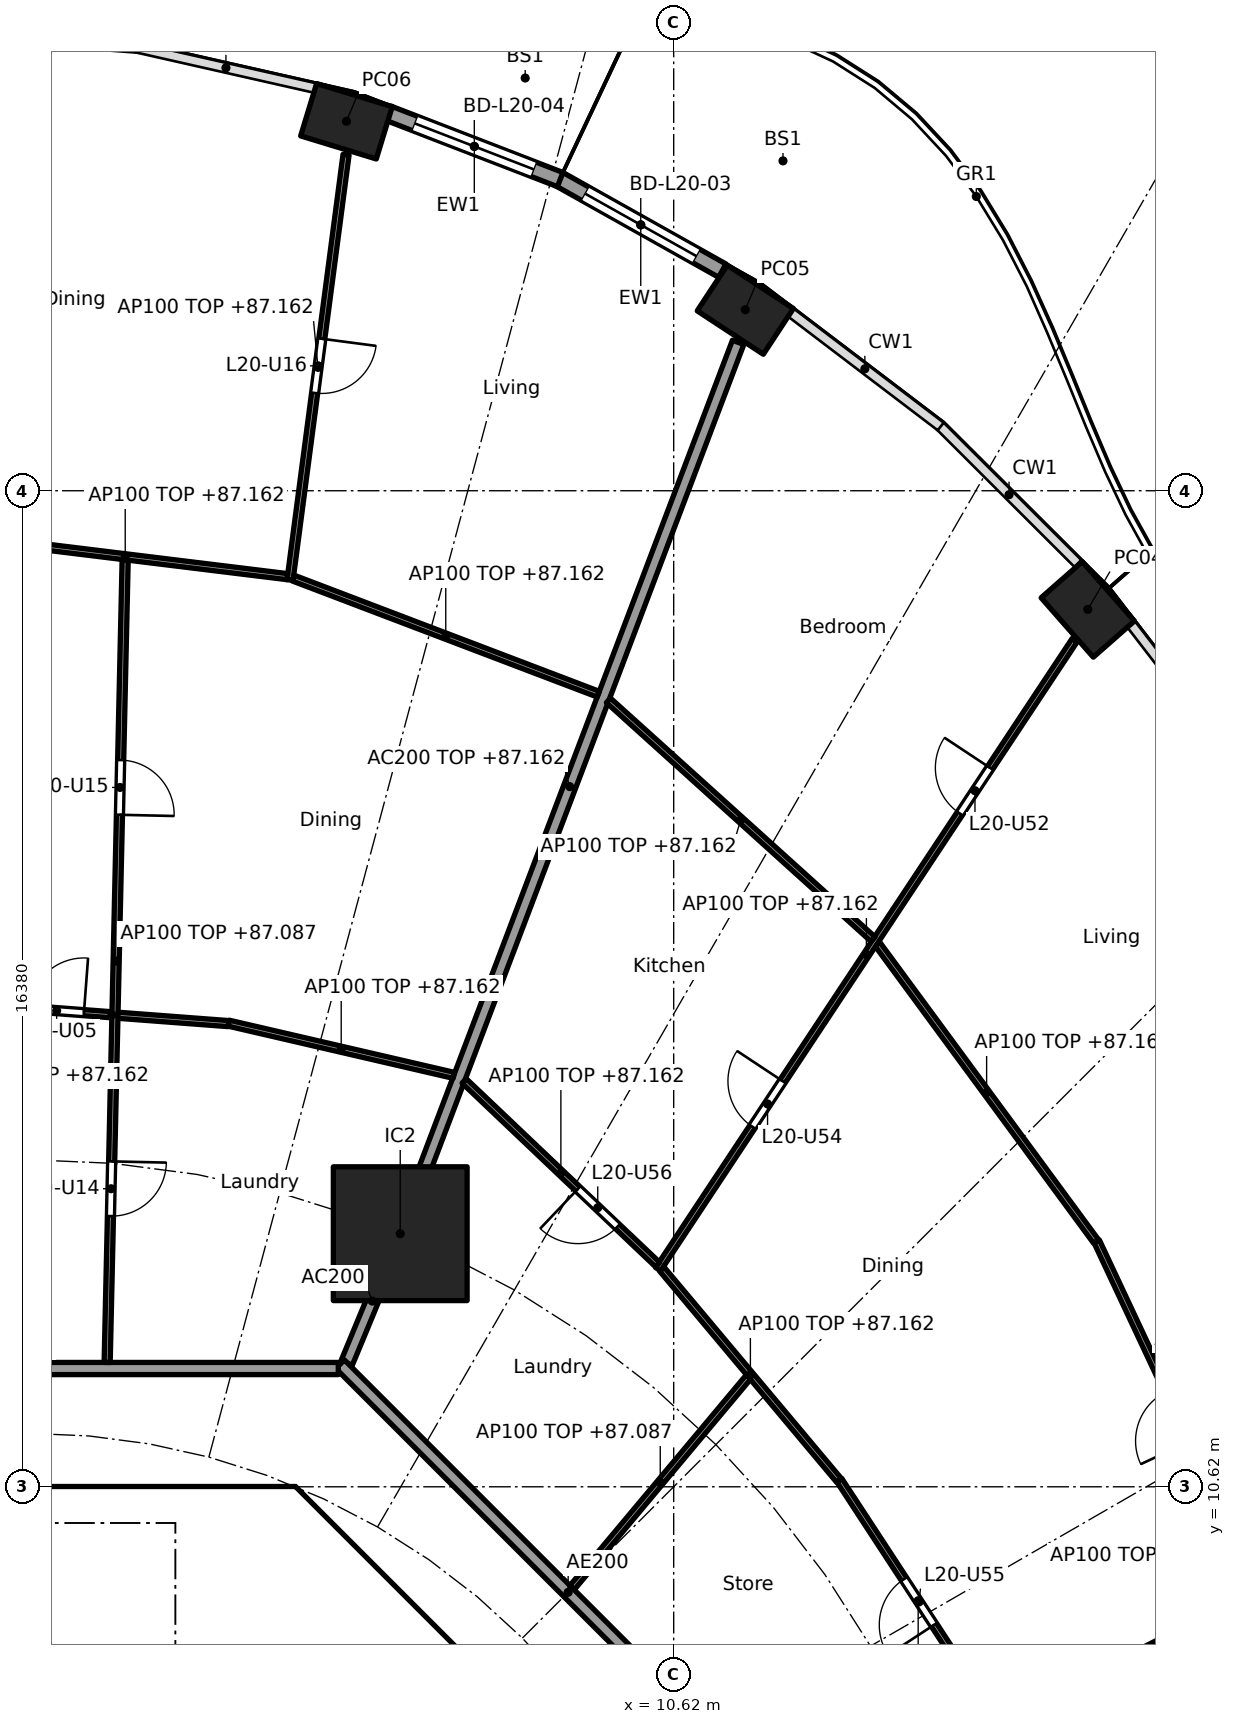
"""IFC4 building model, lengths in metres.
Left out: names, types, materials, properties, quantities, classifications, styles, units other than length and angle.
Written with IfcOpenShell. Run it as: python <this file> out.ifc"""

import sys

from ifc_helpers import new_model, si_unit, direction, frame, frame_2d, origin, origin_2d, place, context, subcontext, project, spatial, polyline, rectangle, hollow_rectangle, outline, extrude, element, fill, save


model = new_model("IFC4")
c1 = context("Model", 3, precision=1e-05, world=origin(), true_north=direction((0.0, 1.0)))
c2 = subcontext(c1, "Body", "Model", "MODEL_VIEW")
j1 = project(units=[si_unit("LENGTHUNIT", "METRE"), si_unit("PLANEANGLEUNIT", "RADIAN")], contexts=[c1])
p1 = place(None, origin())
s1 = spatial("IfcSite", under=j1, at=p1, CompositionType="ELEMENT")
p2 = place(p1, origin())
s2 = spatial("IfcBuilding", under=s1, at=p2, CompositionType="ELEMENT")
p3 = place(p2, frame((0.0, 0.0, 84.4)))
s3 = spatial("IfcBuildingStorey", under=s2, at=p3, CompositionType="ELEMENT", Elevation=84.4)
for number, where, z_axis, x_axis in (
    (1, (17.43, 25.049, 0.0), (0.0, 0.0, 1.0), (-0.66, 0.751, 0.0)),
    (2, (11.798, 29.978, 0.0), (0.0, 0.0, 1.0), (-0.836, 0.549, 0.0)),
    (3, (5.239, 33.076, 0.0), (0.0, 0.0, 1.0), (-0.957, 0.292, 0.0)),
):
    element("IfcColumn", number, at=place(p3, frame(where, z_axis=z_axis, x_axis=x_axis)), inside=s3, PredefinedType="COLUMN", context=c2, shape_type="SweptSolid", body=[
        extrude(hollow_rectangle(XDim=1.3, YDim=0.9, WallThickness=0.045, at=origin_2d()), origin(), (0.0, 0.0, 1.0), 3.7),
    ])
p4 = place(p3, frame((6.123, 14.782, 0.0), z_axis=(0.0, 0.0, 1.0), x_axis=(1.0, 0.0, 0.0)))
e4 = element("IfcColumn", 4, at=p4, inside=s3, PredefinedType="COLUMN", context=c2, shape_type="SweptSolid", body=[
    extrude(rectangle(XDim=2.2, YDim=2.2, at=origin_2d()), origin(), (0.0, 0.0, 1.0), 3.7),
])
p5 = place(p3, frame((8.737, 32.125, 0.0), z_axis=(0.0, 0.0, 1.0), x_axis=(0.872071158476, -0.489379090843, 0.0)))
e5 = element("IfcWall", 5, at=p5, inside=s3, PredefinedType="SOLIDWALL", context=c2, shape_type="SweptSolid", body=[
    extrude(rectangle(XDim=3.076, YDim=0.25, at=frame_2d((1.538, 0.0))), origin(), (0.0, 0.0, 1.0), 3.44),
])
p6 = place(p5, frame((0.488, 0.0, 0.0)))
e6 = element("IfcOpeningElement", 6, at=p6, cuts=e5, PredefinedType="OPENING", context=c2, shape_type="SweptSolid", body=[
    extrude(rectangle(XDim=2.1, YDim=2.4, at=frame_2d((1.05, 1.2))), frame((0.0, 0.135, 0.0), z_axis=(0.0, -1.0, 0.0), x_axis=(1.0, 0.0, 0.0)), (0.0, 0.0, 1.0), 0.27),
])
p7 = place(p3, frame((5.929, 33.208, 0.0), z_axis=(0.0, 0.0, 1.0), x_axis=(0.932837560624, -0.360297218263, 0.0)))
e7 = element("IfcWall", 7, at=p7, inside=s3, PredefinedType="SOLIDWALL", context=c2, shape_type="SweptSolid", body=[
    extrude(rectangle(XDim=3.028, YDim=0.25, at=frame_2d((1.514, 0.0))), origin(), (0.0, 0.0, 1.0), 3.44),
])
p8 = place(p7, frame((0.464, 0.0, 0.0)))
e8 = element("IfcOpeningElement", 8, at=p8, cuts=e7, PredefinedType="OPENING", context=c2, shape_type="SweptSolid", body=[
    extrude(rectangle(XDim=2.1, YDim=2.4, at=frame_2d((1.05, 1.2))), frame((0.0, 0.135, 0.0), z_axis=(0.0, -1.0, 0.0), x_axis=(1.0, 0.0, 0.0)), (0.0, 0.0, 1.0), 0.27),
])
p9 = place(p3, frame((9.988, 4.613, 0.0), z_axis=(0.0, 0.0, 1.0), x_axis=(-0.707106781187, 0.707106781187, 0.0)))
e9 = element("IfcWall", 9, at=p9, inside=s3, PredefinedType="SHEAR", context=c2, shape_type="SweptSolid", body=[
    extrude(rectangle(XDim=7.602, YDim=0.6, at=frame_2d((3.801, 0.0))), origin(), (0.0, 0.0, 1.0), 3.44),
])
p10 = place(p9, frame((3.201, 0.0, 0.0)))
e10 = element("IfcOpeningElement", 10, at=p10, cuts=e9, PredefinedType="OPENING", context=c2, shape_type="SweptSolid", body=[
    extrude(rectangle(XDim=1.2, YDim=2.1, at=frame_2d((0.6, 1.05))), frame((0.0, 0.31, 0.0), z_axis=(0.0, -1.0, 0.0), x_axis=(1.0, 0.0, 0.0)), (0.0, 0.0, 1.0), 0.62),
])
p11 = place(p3, frame((4.0, 7.025, 0.0), z_axis=(0.0, 0.0, 1.0), x_axis=(0.0, 1.0, 0.0)))
e11 = element("IfcWall", 11, at=p11, inside=s3, PredefinedType="SOLIDWALL", context=c2, shape_type="SweptSolid", body=[
    extrude(rectangle(XDim=3.0, YDim=0.2, at=frame_2d((1.5, 0.0))), origin(), (0.0, 0.0, 1.0), 3.44),
])
p12 = place(p11, frame((0.925, 0.0, 0.0)))
e12 = element("IfcOpeningElement", 12, at=p12, cuts=e11, PredefinedType="OPENING", context=c2, shape_type="SweptSolid", body=[
    extrude(rectangle(XDim=1.1, YDim=2.1, at=frame_2d((0.55, 1.05))), frame((0.0, 0.11, 0.0), z_axis=(0.0, -1.0, 0.0), x_axis=(1.0, 0.0, 0.0)), (0.0, 0.0, 1.0), 0.22),
])
p13 = place(p3, origin())
e13 = element("IfcWall", 13, at=p13, inside=s3, PredefinedType="SHEAR", context=c2, shape_type="SweptSolid", body=[
    extrude(outline(polyline([(-4.152, 10.025), (-4.401, 9.776), (-4.825, 10.2), (-4.401, 10.625), (4.401, 10.625), (4.825, 10.2), (4.401, 9.776), (4.152, 10.025), (-4.152, 10.025)])), origin(), (0.0, 0.0, 1.0), 3.44),
])
p14 = place(p3, frame((5.243, 12.657, 0.0), z_axis=(0.0, 0.0, 1.0), x_axis=(0.382724096228, 0.923862687939, 0.0)))
e14 = element("IfcWall", 14, at=p14, inside=s3, PredefinedType="PARTITIONING", context=c2, shape_type="SweptSolid", body=[
    extrude(rectangle(XDim=2.201, YDim=0.2, at=frame_2d((1.1, 0.0))), origin(), (0.0, 0.0, 1.0), 3.44),
])
p15 = place(p3, frame((6.141, 14.829, 0.0), z_axis=(0.0, 0.0, 1.0), x_axis=(0.354477134193, 0.935064682968, 0.0)))
e15 = element("IfcWall", 15, at=p15, inside=s3, PredefinedType="PARTITIONING", context=c2, shape_type="SweptSolid", body=[
    extrude(rectangle(XDim=15.626, YDim=0.2, at=frame_2d((7.813, 0.0))), origin(), (0.0, 0.0, 1.0), 2.762),
])
p16 = place(p3, frame((12.635, 5.134, 0.0), z_axis=(0.0, 0.0, 1.0), x_axis=(-0.707106781187, 0.707106781187, 0.0)))
e16 = element("IfcWall", 16, at=p16, inside=s3, PredefinedType="PARTITIONING", context=c2, shape_type="SweptSolid", body=[
    extrude(rectangle(XDim=10.609, YDim=0.2, at=frame_2d((5.305, 0.0))), origin(), (0.0, 0.0, 1.0), 3.44),
])
p17 = place(p3, frame((5.104, 12.565, 0.0), z_axis=(0.0, 0.0, 1.0), x_axis=(-1.0, 0.0, 0.0)))
e17 = element("IfcWall", 17, at=p17, inside=s3, PredefinedType="PARTITIONING", context=c2, shape_type="SweptSolid", body=[
    extrude(rectangle(XDim=10.409, YDim=0.2, at=frame_2d((5.205, 0.0))), origin(), (0.0, 0.0, 1.0), 3.44),
])
p18 = place(p17, frame((8.508, 0.0, 0.0)))
e18 = element("IfcOpeningElement", 18, at=p18, cuts=e17, PredefinedType="OPENING", context=c2, shape_type="SweptSolid", body=[
    extrude(rectangle(XDim=1.0, YDim=2.1, at=frame_2d((0.5, 1.05))), frame((0.0, 0.11, 0.0), z_axis=(0.0, -1.0, 0.0), x_axis=(1.0, 0.0, 0.0)), (0.0, 0.0, 1.0), 0.22),
])
p19 = place(p3, frame((14.827, 6.146, 0.0), z_axis=(0.0, 0.0, 1.0), x_axis=(0.892068075337, 0.451901038906, 0.0)))
e19 = element("IfcWall", 19, at=p19, inside=s3, PredefinedType="PARTITIONING", context=c2, shape_type="SweptSolid", body=[
    extrude(rectangle(XDim=10.32, YDim=0.1, at=frame_2d((5.16, 0.0))), origin(), (0.0, 0.0, 1.0), 2.762),
])
p20 = place(p19, frame((7.763, 0.0, 0.0)))
e20 = element("IfcOpeningElement", 20, at=p20, cuts=e19, PredefinedType="OPENING", context=c2, shape_type="SweptSolid", body=[
    extrude(rectangle(XDim=0.9, YDim=2.1, at=frame_2d((0.45, 1.05))), frame((0.0, 0.06, 0.0), z_axis=(0.0, -1.0, 0.0), x_axis=(1.0, 0.0, 0.0)), (0.0, 0.0, 1.0), 0.12),
])
p21 = place(p3, frame((15.938, 6.764, 0.0), z_axis=(0.0, 0.0, 1.0), x_axis=(-0.547472878942, 0.836823426311, 0.0)))
e21 = element("IfcWall", 21, at=p21, inside=s3, PredefinedType="PARTITIONING", context=c2, shape_type="SweptSolid", body=[
    extrude(rectangle(XDim=4.738, YDim=0.1, at=frame_2d((2.369, 0.0))), origin(), (0.0, 0.0, 1.0), 2.762),
])
p22 = place(p21, frame((1.894, 0.0, 0.0)))
e22 = element("IfcOpeningElement", 22, at=p22, cuts=e21, PredefinedType="OPENING", context=c2, shape_type="SweptSolid", body=[
    extrude(rectangle(XDim=0.9, YDim=2.1, at=frame_2d((0.45, 1.05))), frame((0.0, 0.06, 0.0), z_axis=(0.0, -1.0, 0.0), x_axis=(1.0, 0.0, 0.0)), (0.0, 0.0, 1.0), 0.12),
])
p23 = place(p3, frame((20.252, 8.95, 0.0), z_axis=(0.0, 0.0, 1.0), x_axis=(-0.424580709335, 0.905390093419, 0.0)))
e23 = element("IfcWall", 23, at=p23, inside=s3, PredefinedType="PARTITIONING", context=c2, shape_type="SweptSolid", body=[
    extrude(rectangle(XDim=6.304, YDim=0.1, at=frame_2d((3.152, 0.0))), origin(), (0.0, 0.0, 1.0), 2.762),
])
p24 = place(p23, frame((2.677, 0.0, 0.0)))
e24 = element("IfcOpeningElement", 24, at=p24, cuts=e23, PredefinedType="OPENING", context=c2, shape_type="SweptSolid", body=[
    extrude(rectangle(XDim=0.9, YDim=2.1, at=frame_2d((0.45, 1.05))), frame((0.0, 0.06, 0.0), z_axis=(0.0, -1.0, 0.0), x_axis=(1.0, 0.0, 0.0)), (0.0, 0.0, 1.0), 0.12),
])
p25 = place(p3, frame((13.339, 10.725, 0.0), z_axis=(0.0, 0.0, 1.0), x_axis=(-0.642515455924, 0.766272724882, 0.0)))
e25 = element("IfcWall", 25, at=p25, inside=s3, PredefinedType="PARTITIONING", context=c2, shape_type="SweptSolid", body=[
    extrude(rectangle(XDim=4.537, YDim=0.1, at=frame_2d((2.269, 0.0))), origin(), (0.0, 0.0, 1.0), 2.762),
])
p26 = place(p3, frame((17.567, 14.653, 0.0), z_axis=(0.0, 0.0, 1.0), x_axis=(-0.592391983588, 0.80564988536, 0.0)))
e26 = element("IfcWall", 26, at=p26, inside=s3, PredefinedType="PARTITIONING", context=c2, shape_type="SweptSolid", body=[
    extrude(rectangle(XDim=6.08, YDim=0.1, at=frame_2d((3.04, 0.0))), origin(), (0.0, 0.0, 1.0), 2.762),
])
p27 = place(p3, frame((8.949, 8.961, 0.0), z_axis=(0.0, 0.0, 1.0), x_axis=(0.642048217601, 0.766664259162, 0.0)))
e27 = element("IfcWall", 27, at=p27, inside=s3, PredefinedType="PARTITIONING", context=c2, shape_type="SweptSolid", body=[
    extrude(rectangle(XDim=4.518, YDim=0.1, at=frame_2d((2.259, 0.0))), origin(), (0.0, 0.0, 1.0), 2.687),
])
p28 = place(p3, frame((10.364, 14.198, 0.0), z_axis=(0.0, 0.0, 1.0), x_axis=(0.552104552927, 0.833774887267, 0.0)))
e28 = element("IfcWall", 28, at=p28, inside=s3, PredefinedType="PARTITIONING", context=c2, shape_type="SweptSolid", body=[
    extrude(rectangle(XDim=12.407, YDim=0.1, at=frame_2d((6.203, 0.0))), origin(), (0.0, 0.0, 1.0), 2.762),
])
p29 = place(p28, frame((8.988, 0.0, 0.0)))
e29 = element("IfcOpeningElement", 29, at=p29, cuts=e28, PredefinedType="OPENING", context=c2, shape_type="SweptSolid", body=[
    extrude(rectangle(XDim=0.9, YDim=2.1, at=frame_2d((0.45, 1.05))), frame((0.0, 0.06, 0.0), z_axis=(0.0, -1.0, 0.0), x_axis=(1.0, 0.0, 0.0)), (0.0, 0.0, 1.0), 0.12),
])
p30 = place(p28, frame((2.809, 0.0, 0.0)))
e30 = element("IfcOpeningElement", 30, at=p30, cuts=e28, PredefinedType="OPENING", context=c2, shape_type="SweptSolid", body=[
    extrude(rectangle(XDim=0.9, YDim=2.1, at=frame_2d((0.45, 1.05))), frame((0.0, 0.06, 0.0), z_axis=(0.0, -1.0, 0.0), x_axis=(1.0, 0.0, 0.0)), (0.0, 0.0, 1.0), 0.12),
])
p31 = place(p3, frame((10.355, 14.274, 0.0), z_axis=(0.0, 0.0, 1.0), x_axis=(-0.725206433622, 0.688531501555, 0.0)))
e31 = element("IfcWall", 31, at=p31, inside=s3, PredefinedType="PARTITIONING", context=c2, shape_type="SweptSolid", body=[
    extrude(rectangle(XDim=4.387, YDim=0.1, at=frame_2d((2.193, 0.0))), origin(), (0.0, 0.0, 1.0), 2.762),
])
p32 = place(p31, frame((0.907, 0.0, 0.0)))
e32 = element("IfcOpeningElement", 32, at=p32, cuts=e31, PredefinedType="OPENING", context=c2, shape_type="SweptSolid", body=[
    extrude(rectangle(XDim=0.9, YDim=2.1, at=frame_2d((0.45, 1.05))), frame((0.0, 0.06, 0.0), z_axis=(0.0, -1.0, 0.0), x_axis=(1.0, 0.0, 0.0)), (0.0, 0.0, 1.0), 0.12),
])
p33 = place(p3, frame((13.898, 19.625, 0.0), z_axis=(0.0, 0.0, 1.0), x_axis=(-0.742396654702, 0.669960601146, 0.0)))
e33 = element("IfcWall", 33, at=p33, inside=s3, PredefinedType="PARTITIONING", context=c2, shape_type="SweptSolid", body=[
    extrude(rectangle(XDim=5.861, YDim=0.1, at=frame_2d((2.931, 0.0))), origin(), (0.0, 0.0, 1.0), 2.762),
])
p34 = place(p3, frame((7.004, 17.386, 0.0), z_axis=(0.0, 0.0, 1.0), x_axis=(-0.974179728512, 0.225773905837, 0.0)))
e34 = element("IfcWall", 34, at=p34, inside=s3, PredefinedType="PARTITIONING", context=c2, shape_type="SweptSolid", body=[
    extrude(rectangle(XDim=3.802, YDim=0.1, at=frame_2d((1.901, 0.0))), origin(), (0.0, 0.0, 1.0), 2.762),
])
p35 = place(p3, frame((9.379, 23.655, 0.0), z_axis=(0.0, 0.0, 1.0), x_axis=(-0.934613076136, 0.355666132653, 0.0)))
e35 = element("IfcWall", 35, at=p35, inside=s3, PredefinedType="PARTITIONING", context=c2, shape_type="SweptSolid", body=[
    extrude(rectangle(XDim=5.366, YDim=0.1, at=frame_2d((2.683, 0.0))), origin(), (0.0, 0.0, 1.0), 2.762),
])
p36 = place(p3, frame((3.299, 18.237, 0.0), z_axis=(0.0, 0.0, 1.0), x_axis=(-0.997152243414, 0.075414875552, 0.0)))
e36 = element("IfcWall", 36, at=p36, inside=s3, PredefinedType="PARTITIONING", context=c2, shape_type="SweptSolid", body=[
    extrude(rectangle(XDim=3.846, YDim=0.1, at=frame_2d((1.923, 0.0))), origin(), (0.0, 0.0, 1.0), 2.762),
])
p37 = place(p36, frame((2.385, 0.0, 0.0)))
e37 = element("IfcOpeningElement", 37, at=p37, cuts=e36, PredefinedType="OPENING", context=c2, shape_type="SweptSolid", body=[
    extrude(rectangle(XDim=0.9, YDim=2.1, at=frame_2d((0.45, 1.05))), frame((0.0, 0.06, 0.0), z_axis=(0.0, -1.0, 0.0), x_axis=(1.0, 0.0, 0.0)), (0.0, 0.0, 1.0), 0.12),
])
p38 = place(p3, frame((4.311, 25.531, 0.0), z_axis=(0.0, 0.0, 1.0), x_axis=(0.130604008227, 0.991434613595, 0.0)))
e38 = element("IfcWall", 38, at=p38, inside=s3, PredefinedType="PARTITIONING", context=c2, shape_type="SweptSolid", body=[
    extrude(rectangle(XDim=7.055, YDim=0.1, at=frame_2d((3.527, 0.0))), origin(), (0.0, 0.0, 1.0), 2.762),
])
p39 = place(p38, frame((3.102, 0.0, 0.0)))
e39 = element("IfcOpeningElement", 39, at=p39, cuts=e38, PredefinedType="OPENING", context=c2, shape_type="SweptSolid", body=[
    extrude(rectangle(XDim=0.9, YDim=2.1, at=frame_2d((0.45, 1.05))), frame((0.0, 0.06, 0.0), z_axis=(0.0, -1.0, 0.0), x_axis=(1.0, 0.0, 0.0)), (0.0, 0.0, 1.0), 0.12),
])
p40 = place(p3, frame((4.267, 25.587, 0.0), z_axis=(0.0, 0.0, 1.0), x_axis=(-0.992576206119, 0.121624319302, 0.0)))
e40 = element("IfcWall", 40, at=p40, inside=s3, PredefinedType="PARTITIONING", context=c2, shape_type="SweptSolid", body=[
    extrude(rectangle(XDim=5.374, YDim=0.1, at=frame_2d((2.687, 0.0))), origin(), (0.0, 0.0, 1.0), 2.762),
])
p41 = place(p3, frame((1.303, 12.665, 0.0), z_axis=(0.0, 0.0, 1.0), x_axis=(0.022412244057, 0.999748814111, 0.0)))
e41 = element("IfcWall", 41, at=p41, inside=s3, PredefinedType="PARTITIONING", context=c2, shape_type="SweptSolid", body=[
    extrude(rectangle(XDim=13.203, YDim=0.1, at=frame_2d((6.601, 0.0))), origin(), (0.0, 0.0, 1.0), 2.687),
])
p42 = place(p41, frame((2.407, 0.0, 0.0)))
e42 = element("IfcOpeningElement", 42, at=p42, cuts=e41, PredefinedType="OPENING", context=c2, shape_type="SweptSolid", body=[
    extrude(rectangle(XDim=0.9, YDim=2.1, at=frame_2d((0.45, 1.05))), frame((0.0, 0.06, 0.0), z_axis=(0.0, -1.0, 0.0), x_axis=(1.0, 0.0, 0.0)), (0.0, 0.0, 1.0), 0.12),
])
p43 = place(p41, frame((9.009, 0.0, 0.0)))
e43 = element("IfcOpeningElement", 43, at=p43, cuts=e41, PredefinedType="OPENING", context=c2, shape_type="SweptSolid", body=[
    extrude(rectangle(XDim=0.9, YDim=2.1, at=frame_2d((0.45, 1.05))), frame((0.0, 0.06, 0.0), z_axis=(0.0, -1.0, 0.0), x_axis=(1.0, 0.0, 0.0)), (0.0, 0.0, 1.0), 0.12),
])
p44 = place(p6, origin())
e44 = element("IfcDoor", 44, at=p44, inside=s3, OperationType="SLIDING_TO_LEFT", PredefinedType="DOOR", context=c2, shape_type="SweptSolid", body=[
    extrude(rectangle(XDim=2.1, YDim=2.4, at=frame_2d((1.05, 1.2))), frame((0.0, 0.025, 0.0), z_axis=(0.0, -1.0, 0.0), x_axis=(1.0, 0.0, 0.0)), (0.0, 0.0, 1.0), 0.05),
])
fill(e6, e44)
p45 = place(p8, origin())
e45 = element("IfcDoor", 45, at=p45, inside=s3, OperationType="SLIDING_TO_LEFT", PredefinedType="DOOR", context=c2, shape_type="SweptSolid", body=[
    extrude(rectangle(XDim=2.1, YDim=2.4, at=frame_2d((1.05, 1.2))), frame((0.0, 0.025, 0.0), z_axis=(0.0, -1.0, 0.0), x_axis=(1.0, 0.0, 0.0)), (0.0, 0.0, 1.0), 0.05),
])
fill(e8, e45)
p46 = place(p12, origin())
e46 = element("IfcDoor", 46, at=p46, inside=s3, OperationType="SINGLE_SWING_RIGHT", PredefinedType="DOOR", context=c2, shape_type="SweptSolid", body=[
    extrude(rectangle(XDim=1.1, YDim=2.1, at=frame_2d((0.55, 1.05))), frame((0.0, 0.025, 0.0), z_axis=(0.0, -1.0, 0.0), x_axis=(1.0, 0.0, 0.0)), (0.0, 0.0, 1.0), 0.05),
])
fill(e12, e46)
p47 = place(p37, frame((0.9, 0.0, 0.0), x_axis=(-1.0, 0.0, 0.0)))
e47 = element("IfcDoor", 47, at=p47, inside=s3, OperationType="SINGLE_SWING_RIGHT", PredefinedType="DOOR", context=c2, shape_type="SweptSolid", body=[
    extrude(rectangle(XDim=0.9, YDim=2.1, at=frame_2d((0.45, 1.05))), frame((0.0, 0.025, 0.0), z_axis=(0.0, -1.0, 0.0), x_axis=(1.0, 0.0, 0.0)), (0.0, 0.0, 1.0), 0.05),
])
fill(e37, e47)
p48 = place(p42, frame((0.9, 0.0, 0.0), x_axis=(-1.0, 0.0, 0.0)))
e48 = element("IfcDoor", 48, at=p48, inside=s3, OperationType="SINGLE_SWING_LEFT", PredefinedType="DOOR", context=c2, shape_type="SweptSolid", body=[
    extrude(rectangle(XDim=0.9, YDim=2.1, at=frame_2d((0.45, 1.05))), frame((0.0, 0.025, 0.0), z_axis=(0.0, -1.0, 0.0), x_axis=(1.0, 0.0, 0.0)), (0.0, 0.0, 1.0), 0.05),
])
fill(e42, e48)
p49 = place(p43, frame((0.9, 0.0, 0.0), x_axis=(-1.0, 0.0, 0.0)))
e49 = element("IfcDoor", 49, at=p49, inside=s3, OperationType="SINGLE_SWING_RIGHT", PredefinedType="DOOR", context=c2, shape_type="SweptSolid", body=[
    extrude(rectangle(XDim=0.9, YDim=2.1, at=frame_2d((0.45, 1.05))), frame((0.0, 0.025, 0.0), z_axis=(0.0, -1.0, 0.0), x_axis=(1.0, 0.0, 0.0)), (0.0, 0.0, 1.0), 0.05),
])
fill(e43, e49)
p50 = place(p39, frame((0.9, 0.0, 0.0), x_axis=(-1.0, 0.0, 0.0)))
e50 = element("IfcDoor", 50, at=p50, inside=s3, OperationType="SINGLE_SWING_LEFT", PredefinedType="DOOR", context=c2, shape_type="SweptSolid", body=[
    extrude(rectangle(XDim=0.9, YDim=2.1, at=frame_2d((0.45, 1.05))), frame((0.0, 0.025, 0.0), z_axis=(0.0, -1.0, 0.0), x_axis=(1.0, 0.0, 0.0)), (0.0, 0.0, 1.0), 0.05),
])
fill(e39, e50)
p51 = place(p29, origin())
e51 = element("IfcDoor", 51, at=p51, inside=s3, OperationType="SINGLE_SWING_RIGHT", PredefinedType="DOOR", context=c2, shape_type="SweptSolid", body=[
    extrude(rectangle(XDim=0.9, YDim=2.1, at=frame_2d((0.45, 1.05))), frame((0.0, 0.025, 0.0), z_axis=(0.0, -1.0, 0.0), x_axis=(1.0, 0.0, 0.0)), (0.0, 0.0, 1.0), 0.05),
])
fill(e29, e51)
p52 = place(p30, origin())
e52 = element("IfcDoor", 52, at=p52, inside=s3, OperationType="SINGLE_SWING_RIGHT", PredefinedType="DOOR", context=c2, shape_type="SweptSolid", body=[
    extrude(rectangle(XDim=0.9, YDim=2.1, at=frame_2d((0.45, 1.05))), frame((0.0, 0.025, 0.0), z_axis=(0.0, -1.0, 0.0), x_axis=(1.0, 0.0, 0.0)), (0.0, 0.0, 1.0), 0.05),
])
fill(e30, e52)
p53 = place(p22, origin())
e53 = element("IfcDoor", 53, at=p53, inside=s3, OperationType="SINGLE_SWING_LEFT", PredefinedType="DOOR", context=c2, shape_type="SweptSolid", body=[
    extrude(rectangle(XDim=0.9, YDim=2.1, at=frame_2d((0.45, 1.05))), frame((0.0, 0.025, 0.0), z_axis=(0.0, -1.0, 0.0), x_axis=(1.0, 0.0, 0.0)), (0.0, 0.0, 1.0), 0.05),
])
fill(e22, e53)
p54 = place(p32, origin())
e54 = element("IfcDoor", 54, at=p54, inside=s3, OperationType="SINGLE_SWING_RIGHT", PredefinedType="DOOR", context=c2, shape_type="SweptSolid", body=[
    extrude(rectangle(XDim=0.9, YDim=2.1, at=frame_2d((0.45, 1.05))), frame((0.0, 0.025, 0.0), z_axis=(0.0, -1.0, 0.0), x_axis=(1.0, 0.0, 0.0)), (0.0, 0.0, 1.0), 0.05),
])
fill(e32, e54)
save(model, sys.argv[1])
